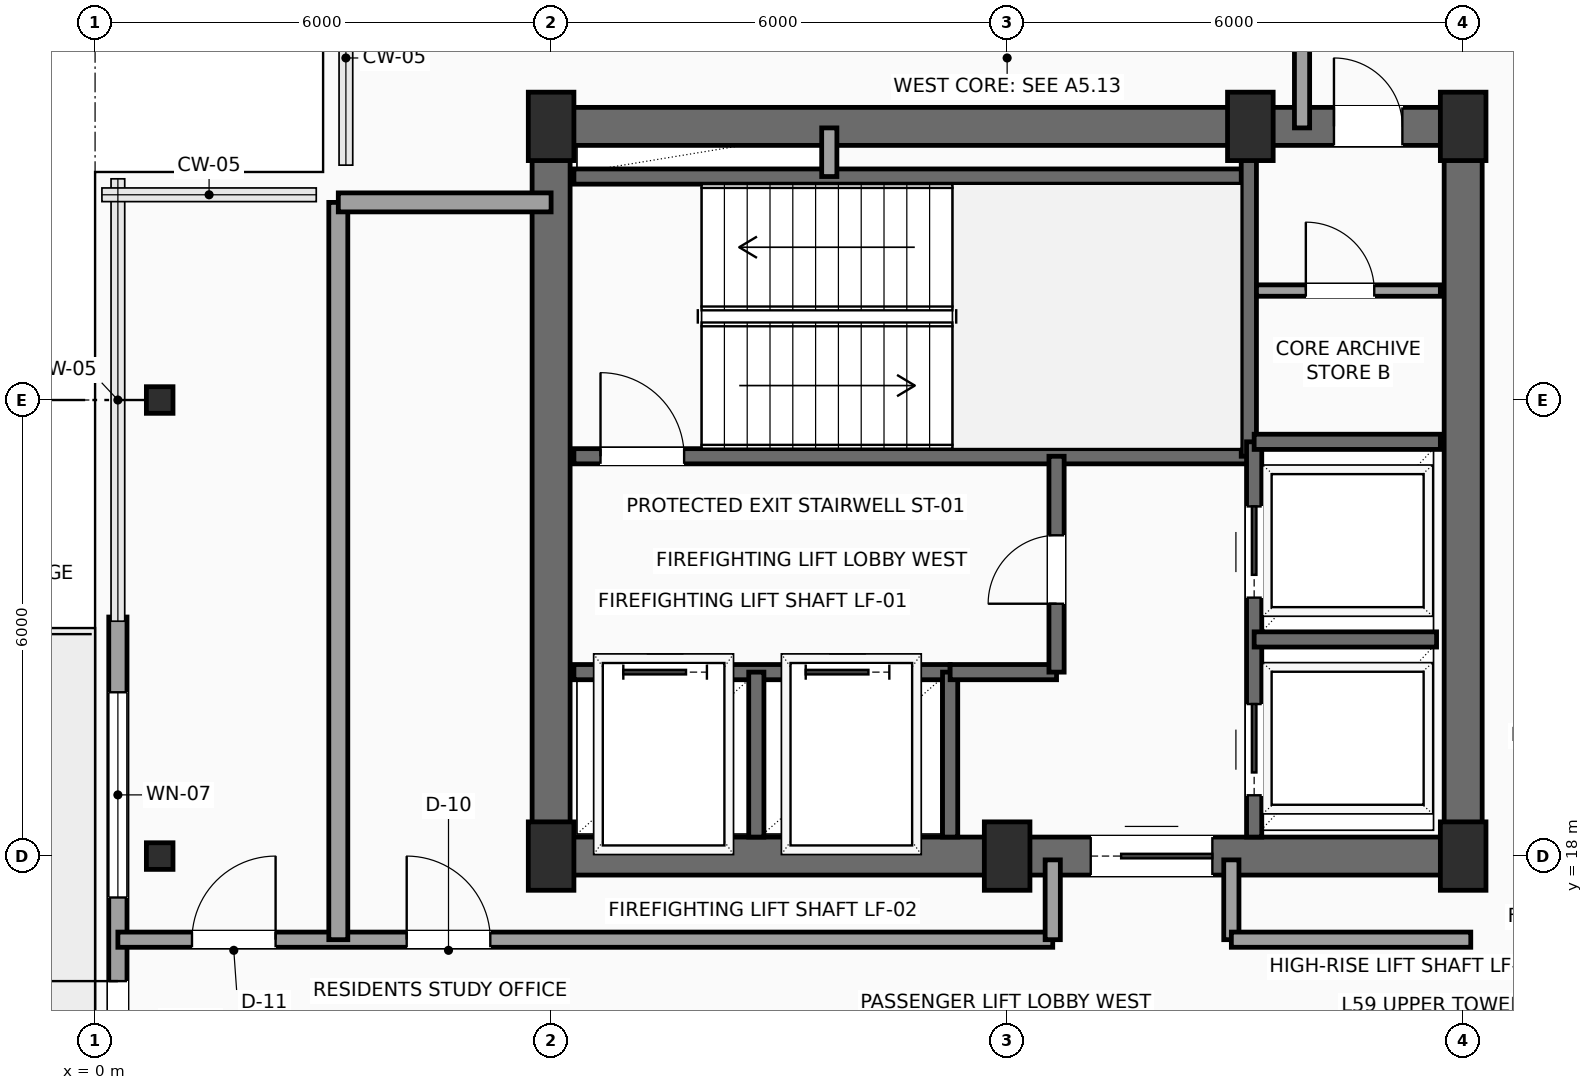
"""IFC4 building model, lengths in metres.
Left out: names, types, materials, properties, quantities, classifications, styles, units other than length and angle.
Written with IfcOpenShell. Run it as: python <this file> out.ifc"""

import sys

from ifc_helpers import new_model, si_unit, direction, frame, frame_2d, origin, origin_2d, place, context, subcontext, project, spatial, rectangle, hollow_rectangle, extrude, element, fill, save


model = new_model("IFC4")
c1 = context("Model", 3, precision=1e-05, world=origin(), true_north=direction((0.0, 1.0)))
c2 = subcontext(c1, "Body", "Model", "MODEL_VIEW")
j1 = project(units=[si_unit("LENGTHUNIT", "METRE"), si_unit("PLANEANGLEUNIT", "RADIAN")], contexts=[c1])
p1 = place(None, origin())
s1 = spatial("IfcSite", under=j1, at=p1, CompositionType="ELEMENT")
p2 = place(p1, origin())
s2 = spatial("IfcBuilding", under=s1, at=p2, CompositionType="ELEMENT")
p3 = place(p2, frame((0.0, 0.0, 239.7)))
s3 = spatial("IfcBuildingStorey", under=s2, at=p3, CompositionType="ELEMENT", Elevation=239.7)
for number, where, z_axis, x_axis in (
    (1, (6.0, 18.0, 0.0), (0.0, 0.0, 1.0), (1.0, 0.0, 0.0)),
    (2, (12.0, 18.0, 0.0), (0.0, 0.0, 1.0), (1.0, 0.0, 0.0)),
    (3, (18.0, 18.0, 0.0), (0.0, 0.0, 1.0), (1.0, 0.0, 0.0)),
    (4, (6.0, 27.6, 0.0), (0.0, 0.0, 1.0), (1.0, 0.0, 0.0)),
    (5, (15.2, 27.6, 0.0), (0.0, 0.0, 1.0), (1.0, 0.0, 0.0)),
    (6, (18.0, 27.6, 0.0), (0.0, 0.0, 1.0), (1.0, 0.0, 0.0)),
):
    element("IfcColumn", number, at=place(p3, frame(where, z_axis=z_axis, x_axis=x_axis)), inside=s3, PredefinedType="COLUMN", context=c2, shape_type="SweptSolid", body=[
        extrude(rectangle(XDim=0.6, YDim=0.9, at=origin_2d()), origin(), (0.0, 0.0, 1.0), 3.5),
    ])
for number, where, z_axis, x_axis in (
    (7, (0.85, 18.0, 0.0), (0.0, 0.0, 1.0), (1.0, 0.0, 0.0)),
    (8, (0.85, 24.0, 0.0), (0.0, 0.0, 1.0), (1.0, 0.0, 0.0)),
):
    element("IfcColumn", number, at=place(p3, frame(where, z_axis=z_axis, x_axis=x_axis)), inside=s3, PredefinedType="COLUMN", context=c2, shape_type="SweptSolid", body=[
        extrude(hollow_rectangle(XDim=0.35, YDim=0.35, WallThickness=0.016, InnerFilletRadius=0.016, OuterFilletRadius=0.032, at=origin_2d()), origin(), (0.0, 0.0, 1.0), 3.5),
    ])
p4 = place(p3, frame((0.3, 11.855, 0.0), z_axis=(0.0, 0.0, 1.0), x_axis=(0.0, 1.0, 0.0)))
e9 = element("IfcWall", 9, at=p4, inside=s3, PredefinedType="SOLIDWALL", context=c2, shape_type="SweptSolid", body=[
    extrude(rectangle(XDim=9.29, YDim=0.24, at=frame_2d((4.645, 0.0))), origin(), (0.0, 0.0, 1.0), 3.3),
])
p5 = place(p4, frame((3.45, 0.0, 0.0)))
e10 = element("IfcOpeningElement", 10, at=p5, cuts=e9, PredefinedType="OPENING", context=c2, shape_type="SweptSolid", body=[
    extrude(rectangle(XDim=1.05, YDim=2.2, at=frame_2d((0.525, 1.1))), frame((0.0, 0.13, 0.0), z_axis=(0.0, -1.0, 0.0), x_axis=(1.0, 0.0, 0.0)), (0.0, 0.0, 1.0), 0.26),
])
p6 = place(p4, frame((5.6, 0.0, 0.6)))
e11 = element("IfcOpeningElement", 11, at=p6, cuts=e9, PredefinedType="OPENING", context=c2, shape_type="SweptSolid", body=[
    extrude(rectangle(XDim=2.7, YDim=2.3, at=frame_2d((1.35, 1.15))), frame((0.0, 0.13, 0.0), z_axis=(0.0, -1.0, 0.0), x_axis=(1.0, 0.0, 0.0)), (0.0, 0.0, 1.0), 0.26),
])
p7 = place(p4, frame((0.7, 0.0, 0.6)))
e12 = element("IfcOpeningElement", 12, at=p7, cuts=e9, PredefinedType="OPENING", context=c2, shape_type="SweptSolid", body=[
    extrude(rectangle(XDim=0.9, YDim=2.2, at=frame_2d((0.45, 1.1))), frame((0.0, 0.13, 0.0), z_axis=(0.0, -1.0, 0.0), x_axis=(1.0, 0.0, 0.0)), (0.0, 0.0, 1.0), 0.26),
])
p8 = place(p3, frame((6.0, 18.0, 0.0), z_axis=(0.0, 0.0, 1.0), x_axis=(1.0, 0.0, 0.0)))
e13 = element("IfcWall", 13, at=p8, inside=s3, PredefinedType="SHEAR", context=c2, shape_type="SweptSolid", body=[
    extrude(rectangle(XDim=12.0, YDim=0.5, at=frame_2d((6.0, 0.0))), origin(), (0.0, 0.0, 1.0), 3.3),
])
p9 = place(p8, frame((7.1, 0.0, 0.0)))
e14 = element("IfcOpeningElement", 14, at=p9, cuts=e13, PredefinedType="OPENING", context=c2, shape_type="SweptSolid", body=[
    extrude(rectangle(XDim=1.6, YDim=2.3, at=frame_2d((0.8, 1.15))), frame((0.0, 0.26, 0.0), z_axis=(0.0, -1.0, 0.0), x_axis=(1.0, 0.0, 0.0)), (0.0, 0.0, 1.0), 0.52),
])
p10 = place(p3, frame((6.0, 27.6, 0.0), z_axis=(0.0, 0.0, 1.0), x_axis=(1.0, 0.0, 0.0)))
e15 = element("IfcWall", 15, at=p10, inside=s3, PredefinedType="SHEAR", context=c2, shape_type="SweptSolid", body=[
    extrude(rectangle(XDim=12.0, YDim=0.5, at=frame_2d((6.0, 0.0))), origin(), (0.0, 0.0, 1.0), 3.3),
])
p11 = place(p10, frame((10.3, 0.0, 0.0)))
e16 = element("IfcOpeningElement", 16, at=p11, cuts=e15, PredefinedType="OPENING", context=c2, shape_type="SweptSolid", body=[
    extrude(rectangle(XDim=0.9, YDim=2.15, at=frame_2d((0.45, 1.075))), frame((0.0, 0.26, 0.0), z_axis=(0.0, -1.0, 0.0), x_axis=(1.0, 0.0, 0.0)), (0.0, 0.0, 1.0), 0.52),
])
for number, where, z_axis, x_axis in (
    (17, (6.0, 18.0, 0.0), (0.0, 0.0, 1.0), (0.0, 1.0, 0.0)),
    (18, (18.0, 18.0, 0.0), (0.0, 0.0, 1.0), (0.0, 1.0, 0.0)),
):
    element("IfcWall", number, at=place(p3, frame(where, z_axis=z_axis, x_axis=x_axis)), inside=s3, PredefinedType="SHEAR", context=c2, shape_type="SweptSolid", body=[
        extrude(rectangle(XDim=9.6, YDim=0.5, at=frame_2d((4.8, 0.0))), origin(), (0.0, 0.0, 1.0), 3.3),
    ])
p12 = place(p3, frame((6.3, 23.26, 0.0), z_axis=(0.0, 0.0, 1.0), x_axis=(1.0, 0.0, 0.0)))
e19 = element("IfcWall", 19, at=p12, inside=s3, PredefinedType="SHEAR", context=c2, shape_type="SweptSolid", body=[
    extrude(rectangle(XDim=8.88, YDim=0.2, at=frame_2d((4.44, 0.0))), origin(), (0.0, 0.0, 1.0), 3.3),
])
p13 = place(p12, frame((0.35, 0.0, 0.0)))
e20 = element("IfcOpeningElement", 20, at=p13, cuts=e19, PredefinedType="OPENING", context=c2, shape_type="SweptSolid", body=[
    extrude(rectangle(XDim=1.1, YDim=2.2, at=frame_2d((0.55, 1.1))), frame((0.0, 0.11, 0.0), z_axis=(0.0, -1.0, 0.0), x_axis=(1.0, 0.0, 0.0)), (0.0, 0.0, 1.0), 0.22),
])
p14 = place(p3, frame((6.3, 26.94, 0.0), z_axis=(0.0, 0.0, 1.0), x_axis=(1.0, 0.0, 0.0)))
e21 = element("IfcWall", 21, at=p14, inside=s3, PredefinedType="SHEAR", context=c2, shape_type="SweptSolid", body=[
    extrude(rectangle(XDim=8.88, YDim=0.2, at=frame_2d((4.44, 0.0))), origin(), (0.0, 0.0, 1.0), 3.3),
])
p15 = place(p3, frame((15.18, 23.26, 0.0), z_axis=(0.0, 0.0, 1.0), x_axis=(0.0, 1.0, 0.0)))
e22 = element("IfcWall", 22, at=p15, inside=s3, PredefinedType="SHEAR", context=c2, shape_type="SweptSolid", body=[
    extrude(rectangle(XDim=4.04, YDim=0.2, at=frame_2d((2.02, 0.0))), origin(), (0.0, 0.0, 1.0), 3.3),
])
p16 = place(p3, frame((6.3, 20.42, 0.0), z_axis=(0.0, 0.0, 1.0), x_axis=(1.0, 0.0, 0.0)))
e23 = element("IfcWall", 23, at=p16, inside=s3, PredefinedType="SHEAR", context=c2, shape_type="SweptSolid", body=[
    extrude(rectangle(XDim=4.95, YDim=0.2, at=frame_2d((2.475, 0.0))), origin(), (0.0, 0.0, 1.0), 3.3),
])
p17 = place(p16, frame((0.65, 0.0, 0.0)))
e24 = element("IfcOpeningElement", 24, at=p17, cuts=e23, PredefinedType="OPENING", context=c2, shape_type="SweptSolid", body=[
    extrude(rectangle(XDim=1.1, YDim=2.2, at=frame_2d((0.55, 1.1))), frame((0.0, 0.11, 0.0), z_axis=(0.0, -1.0, 0.0), x_axis=(1.0, 0.0, 0.0)), (0.0, 0.0, 1.0), 0.22),
])
p18 = place(p16, frame((3.05, 0.0, 0.0)))
e25 = element("IfcOpeningElement", 25, at=p18, cuts=e23, PredefinedType="OPENING", context=c2, shape_type="SweptSolid", body=[
    extrude(rectangle(XDim=1.1, YDim=2.2, at=frame_2d((0.55, 1.1))), frame((0.0, 0.11, 0.0), z_axis=(0.0, -1.0, 0.0), x_axis=(1.0, 0.0, 0.0)), (0.0, 0.0, 1.0), 0.22),
])
for number, where, z_axis, x_axis in (
    (26, (8.7, 18.25, 0.0), (0.0, 0.0, 1.0), (0.0, 1.0, 0.0)),
    (27, (11.25, 18.25, 0.0), (0.0, 0.0, 1.0), (0.0, 1.0, 0.0)),
):
    element("IfcWall", number, at=place(p3, frame(where, z_axis=z_axis, x_axis=x_axis)), inside=s3, PredefinedType="SHEAR", context=c2, shape_type="SweptSolid", body=[
        extrude(rectangle(XDim=2.17, YDim=0.2, at=frame_2d((1.085, 0.0))), origin(), (0.0, 0.0, 1.0), 3.3),
    ])
p19 = place(p3, frame((11.25, 20.42, 0.0), z_axis=(0.0, 0.0, 1.0), x_axis=(1.0, 0.0, 0.0)))
e28 = element("IfcWall", 28, at=p19, inside=s3, PredefinedType="SHEAR", context=c2, shape_type="SweptSolid", body=[
    extrude(rectangle(XDim=1.4, YDim=0.2, at=frame_2d((0.7, 0.0))), origin(), (0.0, 0.0, 1.0), 3.3),
])
p20 = place(p3, frame((12.65, 20.42, 0.0), z_axis=(0.0, 0.0, 1.0), x_axis=(0.0, 1.0, 0.0)))
e29 = element("IfcWall", 29, at=p20, inside=s3, PredefinedType="SHEAR", context=c2, shape_type="SweptSolid", body=[
    extrude(rectangle(XDim=2.84, YDim=0.2, at=frame_2d((1.42, 0.0))), origin(), (0.0, 0.0, 1.0), 3.3),
])
p21 = place(p20, frame((0.9, 0.0, 0.0)))
e30 = element("IfcOpeningElement", 30, at=p21, cuts=e29, PredefinedType="OPENING", context=c2, shape_type="SweptSolid", body=[
    extrude(rectangle(XDim=0.9, YDim=2.15, at=frame_2d((0.45, 1.075))), frame((0.0, 0.11, 0.0), z_axis=(0.0, -1.0, 0.0), x_axis=(1.0, 0.0, 0.0)), (0.0, 0.0, 1.0), 0.22),
])
p22 = place(p3, frame((9.66, 26.94, 0.0), z_axis=(0.0, 0.0, 1.0), x_axis=(0.0, 1.0, 0.0)))
e31 = element("IfcWall", 31, at=p22, inside=s3, PredefinedType="SOLIDWALL", context=c2, shape_type="SweptSolid", body=[
    extrude(rectangle(XDim=0.64, YDim=0.2, at=frame_2d((0.32, 0.0))), origin(), (0.0, 0.0, 1.0), 3.3),
])
p23 = place(p3, frame((15.25, 18.25, 0.0), z_axis=(0.0, 0.0, 1.0), x_axis=(0.0, 1.0, 0.0)))
e32 = element("IfcWall", 32, at=p23, inside=s3, PredefinedType="SHEAR", context=c2, shape_type="SweptSolid", body=[
    extrude(rectangle(XDim=5.2, YDim=0.2, at=frame_2d((2.6, 0.0))), origin(), (0.0, 0.0, 1.0), 3.3),
])
p24 = place(p23, frame((0.55, 0.0, 0.0)))
e33 = element("IfcOpeningElement", 33, at=p24, cuts=e32, PredefinedType="OPENING", context=c2, shape_type="SweptSolid", body=[
    extrude(rectangle(XDim=1.2, YDim=2.2, at=frame_2d((0.6, 1.1))), frame((0.0, 0.11, 0.0), z_axis=(0.0, -1.0, 0.0), x_axis=(1.0, 0.0, 0.0)), (0.0, 0.0, 1.0), 0.22),
])
p25 = place(p23, frame((3.15, 0.0, 0.0)))
e34 = element("IfcOpeningElement", 34, at=p25, cuts=e32, PredefinedType="OPENING", context=c2, shape_type="SweptSolid", body=[
    extrude(rectangle(XDim=1.2, YDim=2.2, at=frame_2d((0.6, 1.1))), frame((0.0, 0.11, 0.0), z_axis=(0.0, -1.0, 0.0), x_axis=(1.0, 0.0, 0.0)), (0.0, 0.0, 1.0), 0.22),
])
p26 = place(p3, frame((15.25, 20.85, 0.0), z_axis=(0.0, 0.0, 1.0), x_axis=(1.0, 0.0, 0.0)))
e35 = element("IfcWall", 35, at=p26, inside=s3, PredefinedType="SHEAR", context=c2, shape_type="SweptSolid", body=[
    extrude(rectangle(XDim=2.4, YDim=0.2, at=frame_2d((1.2, 0.0))), origin(), (0.0, 0.0, 1.0), 3.3),
])
p27 = place(p3, frame((15.25, 23.45, 0.0), z_axis=(0.0, 0.0, 1.0), x_axis=(1.0, 0.0, 0.0)))
e36 = element("IfcWall", 36, at=p27, inside=s3, PredefinedType="SHEAR", context=c2, shape_type="SweptSolid", body=[
    extrude(rectangle(XDim=2.45, YDim=0.2, at=frame_2d((1.225, 0.0))), origin(), (0.0, 0.0, 1.0), 3.3),
])
p28 = place(p3, frame((15.28, 25.44, 0.0), z_axis=(0.0, 0.0, 1.0), x_axis=(1.0, 0.0, 0.0)))
e37 = element("IfcWall", 37, at=p28, inside=s3, PredefinedType="PARTITIONING", context=c2, shape_type="SweptSolid", body=[
    extrude(rectangle(XDim=2.42, YDim=0.15, at=frame_2d((1.21, 0.0))), origin(), (0.0, 0.0, 1.0), 3.3),
])
p29 = place(p28, frame((0.65, 0.0, 0.0)))
e38 = element("IfcOpeningElement", 38, at=p29, cuts=e37, PredefinedType="OPENING", context=c2, shape_type="SweptSolid", body=[
    extrude(rectangle(XDim=0.9, YDim=2.15, at=frame_2d((0.45, 1.075))), frame((0.0, 0.085, 0.0), z_axis=(0.0, -1.0, 0.0), x_axis=(1.0, 0.0, 0.0)), (0.0, 0.0, 1.0), 0.17),
])
p30 = place(p3, frame((0.3, 16.9, 0.0), z_axis=(0.0, 0.0, 1.0), x_axis=(1.0, 0.0, 0.0)))
e39 = element("IfcWall", 39, at=p30, inside=s3, PredefinedType="PARTITIONING", context=c2, shape_type="SweptSolid", body=[
    extrude(rectangle(XDim=12.3, YDim=0.2, at=frame_2d((6.15, 0.0))), origin(), (0.0, 0.0, 1.0), 3.3),
])
p31 = place(p30, frame((0.975, 0.0, 0.0)))
e40 = element("IfcOpeningElement", 40, at=p31, cuts=e39, PredefinedType="OPENING", context=c2, shape_type="SweptSolid", body=[
    extrude(rectangle(XDim=1.1, YDim=2.25, at=frame_2d((0.55, 1.125))), frame((0.0, 0.11, 0.0), z_axis=(0.0, -1.0, 0.0), x_axis=(1.0, 0.0, 0.0)), (0.0, 0.0, 1.0), 0.22),
])
p32 = place(p30, frame((3.8, 0.0, 0.0)))
e41 = element("IfcOpeningElement", 41, at=p32, cuts=e39, PredefinedType="OPENING", context=c2, shape_type="SweptSolid", body=[
    extrude(rectangle(XDim=1.1, YDim=2.25, at=frame_2d((0.55, 1.125))), frame((0.0, 0.11, 0.0), z_axis=(0.0, -1.0, 0.0), x_axis=(1.0, 0.0, 0.0)), (0.0, 0.0, 1.0), 0.22),
])
for number, where, z_axis, x_axis in (
    (42, (12.6, 16.9, 0.0), (0.0, 0.0, 1.0), (0.0, 1.0, 0.0)),
    (43, (14.95, 17.95, 0.0), (0.0, 0.0, 1.0), (0.0, -1.0, 0.0)),
):
    element("IfcWall", number, at=place(p3, frame(where, z_axis=z_axis, x_axis=x_axis)), inside=s3, PredefinedType="PARTITIONING", context=c2, shape_type="SweptSolid", body=[
        extrude(rectangle(XDim=1.05, YDim=0.2, at=frame_2d((0.525, 0.0))), origin(), (0.0, 0.0, 1.0), 3.3),
    ])
p33 = place(p3, frame((14.95, 16.9, 0.0), z_axis=(0.0, 0.0, 1.0), x_axis=(1.0, 0.0, 0.0)))
e44 = element("IfcWall", 44, at=p33, inside=s3, PredefinedType="PARTITIONING", context=c2, shape_type="SweptSolid", body=[
    extrude(rectangle(XDim=3.15, YDim=0.2, at=frame_2d((1.575, 0.0))), origin(), (0.0, 0.0, 1.0), 3.3),
])
p34 = place(p3, frame((15.88, 27.58, 0.0), z_axis=(0.0, 0.0, 1.0), x_axis=(0.0, 1.0, 0.0)))
e45 = element("IfcWall", 45, at=p34, inside=s3, PredefinedType="PARTITIONING", context=c2, shape_type="SweptSolid", body=[
    extrude(rectangle(XDim=2.12, YDim=0.2, at=frame_2d((1.06, 0.0))), origin(), (0.0, 0.0, 1.0), 3.3),
])
p35 = place(p3, frame((3.2, 16.9, 0.0), z_axis=(0.0, 0.0, 1.0), x_axis=(0.0, 1.0, 0.0)))
e46 = element("IfcWall", 46, at=p35, inside=s3, PredefinedType="PARTITIONING", context=c2, shape_type="SweptSolid", body=[
    extrude(rectangle(XDim=9.7, YDim=0.25, at=frame_2d((4.85, 0.0))), origin(), (0.0, 0.0, 1.0), 3.3),
])
p36 = place(p3, frame((3.2, 26.6, 0.0), z_axis=(0.0, 0.0, 1.0), x_axis=(1.0, 0.0, 0.0)))
e47 = element("IfcWall", 47, at=p36, inside=s3, PredefinedType="PARTITIONING", context=c2, shape_type="SweptSolid", body=[
    extrude(rectangle(XDim=2.8, YDim=0.25, at=frame_2d((1.4, 0.0))), origin(), (0.0, 0.0, 1.0), 3.3),
])
p37 = place(p5, origin())
e48 = element("IfcDoor", 48, at=p37, inside=s3, OperationType="SINGLE_SWING_RIGHT", PredefinedType="DOOR", context=c2, shape_type="SweptSolid", body=[
    extrude(rectangle(XDim=1.05, YDim=2.2, at=frame_2d((0.525, 1.1))), frame((0.0, 0.025, 0.0), z_axis=(0.0, -1.0, 0.0), x_axis=(1.0, 0.0, 0.0)), (0.0, 0.0, 1.0), 0.05),
])
fill(e10, e48)
p38 = place(p6, origin())
e49 = element("IfcWindow", 49, at=p38, inside=s3, PartitioningType="SINGLE_PANEL", PredefinedType="WINDOW", context=c2, shape_type="SweptSolid", body=[
    extrude(rectangle(XDim=2.7, YDim=2.3, at=frame_2d((1.35, 1.15))), frame((0.0, 0.03, 0.0), z_axis=(0.0, -1.0, 0.0), x_axis=(1.0, 0.0, 0.0)), (0.0, 0.0, 1.0), 0.06),
])
fill(e11, e49)
p39 = place(p9, origin())
e50 = element("IfcDoor", 50, at=p39, inside=s3, OperationType="DOUBLE_DOOR_SLIDING", PredefinedType="DOOR", context=c2, shape_type="SweptSolid", body=[
    extrude(rectangle(XDim=1.6, YDim=2.3, at=frame_2d((0.8, 1.15))), frame((0.0, 0.025, 0.0), z_axis=(0.0, -1.0, 0.0), x_axis=(1.0, 0.0, 0.0)), (0.0, 0.0, 1.0), 0.05),
])
fill(e14, e50)
p40 = place(p11, origin())
e51 = element("IfcDoor", 51, at=p40, inside=s3, OperationType="SINGLE_SWING_LEFT", PredefinedType="DOOR", context=c2, shape_type="SweptSolid", body=[
    extrude(rectangle(XDim=0.9, YDim=2.15, at=frame_2d((0.45, 1.075))), frame((0.0, 0.025, 0.0), z_axis=(0.0, -1.0, 0.0), x_axis=(1.0, 0.0, 0.0)), (0.0, 0.0, 1.0), 0.05),
])
fill(e16, e51)
p41 = place(p13, origin())
e52 = element("IfcDoor", 52, at=p41, inside=s3, OperationType="SINGLE_SWING_LEFT", PredefinedType="DOOR", context=c2, shape_type="SweptSolid", body=[
    extrude(rectangle(XDim=1.1, YDim=2.2, at=frame_2d((0.55, 1.1))), frame((0.0, 0.025, 0.0), z_axis=(0.0, -1.0, 0.0), x_axis=(1.0, 0.0, 0.0)), (0.0, 0.0, 1.0), 0.05),
])
fill(e20, e52)
p42 = place(p17, origin())
e53 = element("IfcDoor", 53, at=p42, inside=s3, OperationType="SLIDING_TO_LEFT", PredefinedType="DOOR", context=c2, shape_type="SweptSolid", body=[
    extrude(rectangle(XDim=1.1, YDim=2.2, at=frame_2d((0.55, 1.1))), frame((0.0, 0.025, 0.0), z_axis=(0.0, -1.0, 0.0), x_axis=(1.0, 0.0, 0.0)), (0.0, 0.0, 1.0), 0.05),
])
fill(e24, e53)
p43 = place(p18, origin())
e54 = element("IfcDoor", 54, at=p43, inside=s3, OperationType="SLIDING_TO_LEFT", PredefinedType="DOOR", context=c2, shape_type="SweptSolid", body=[
    extrude(rectangle(XDim=1.1, YDim=2.2, at=frame_2d((0.55, 1.1))), frame((0.0, 0.025, 0.0), z_axis=(0.0, -1.0, 0.0), x_axis=(1.0, 0.0, 0.0)), (0.0, 0.0, 1.0), 0.05),
])
fill(e25, e54)
p44 = place(p21, origin())
e55 = element("IfcDoor", 55, at=p44, inside=s3, OperationType="SINGLE_SWING_LEFT", PredefinedType="DOOR", context=c2, shape_type="SweptSolid", body=[
    extrude(rectangle(XDim=0.9, YDim=2.15, at=frame_2d((0.45, 1.075))), frame((0.0, 0.025, 0.0), z_axis=(0.0, -1.0, 0.0), x_axis=(1.0, 0.0, 0.0)), (0.0, 0.0, 1.0), 0.05),
])
fill(e30, e55)
p45 = place(p24, origin())
e56 = element("IfcDoor", 56, at=p45, inside=s3, OperationType="SLIDING_TO_RIGHT", PredefinedType="DOOR", context=c2, shape_type="SweptSolid", body=[
    extrude(rectangle(XDim=1.2, YDim=2.2, at=frame_2d((0.6, 1.1))), frame((0.0, 0.025, 0.0), z_axis=(0.0, -1.0, 0.0), x_axis=(1.0, 0.0, 0.0)), (0.0, 0.0, 1.0), 0.05),
])
fill(e33, e56)
p46 = place(p25, origin())
e57 = element("IfcDoor", 57, at=p46, inside=s3, OperationType="SLIDING_TO_RIGHT", PredefinedType="DOOR", context=c2, shape_type="SweptSolid", body=[
    extrude(rectangle(XDim=1.2, YDim=2.2, at=frame_2d((0.6, 1.1))), frame((0.0, 0.025, 0.0), z_axis=(0.0, -1.0, 0.0), x_axis=(1.0, 0.0, 0.0)), (0.0, 0.0, 1.0), 0.05),
])
fill(e34, e57)
p47 = place(p29, origin())
e58 = element("IfcDoor", 58, at=p47, inside=s3, OperationType="SINGLE_SWING_LEFT", PredefinedType="DOOR", context=c2, shape_type="SweptSolid", body=[
    extrude(rectangle(XDim=0.9, YDim=2.15, at=frame_2d((0.45, 1.075))), frame((0.0, 0.025, 0.0), z_axis=(0.0, -1.0, 0.0), x_axis=(1.0, 0.0, 0.0)), (0.0, 0.0, 1.0), 0.05),
])
fill(e38, e58)
p48 = place(p31, origin())
e59 = element("IfcDoor", 59, at=p48, inside=s3, OperationType="SINGLE_SWING_RIGHT", PredefinedType="DOOR", context=c2, shape_type="SweptSolid", body=[
    extrude(rectangle(XDim=1.1, YDim=2.25, at=frame_2d((0.55, 1.125))), frame((0.0, 0.025, 0.0), z_axis=(0.0, -1.0, 0.0), x_axis=(1.0, 0.0, 0.0)), (0.0, 0.0, 1.0), 0.05),
])
fill(e40, e59)
p49 = place(p32, origin())
e60 = element("IfcDoor", 60, at=p49, inside=s3, OperationType="SINGLE_SWING_LEFT", PredefinedType="DOOR", context=c2, shape_type="SweptSolid", body=[
    extrude(rectangle(XDim=1.1, YDim=2.25, at=frame_2d((0.55, 1.125))), frame((0.0, 0.025, 0.0), z_axis=(0.0, -1.0, 0.0), x_axis=(1.0, 0.0, 0.0)), (0.0, 0.0, 1.0), 0.05),
])
fill(e41, e60)
save(model, sys.argv[1])
